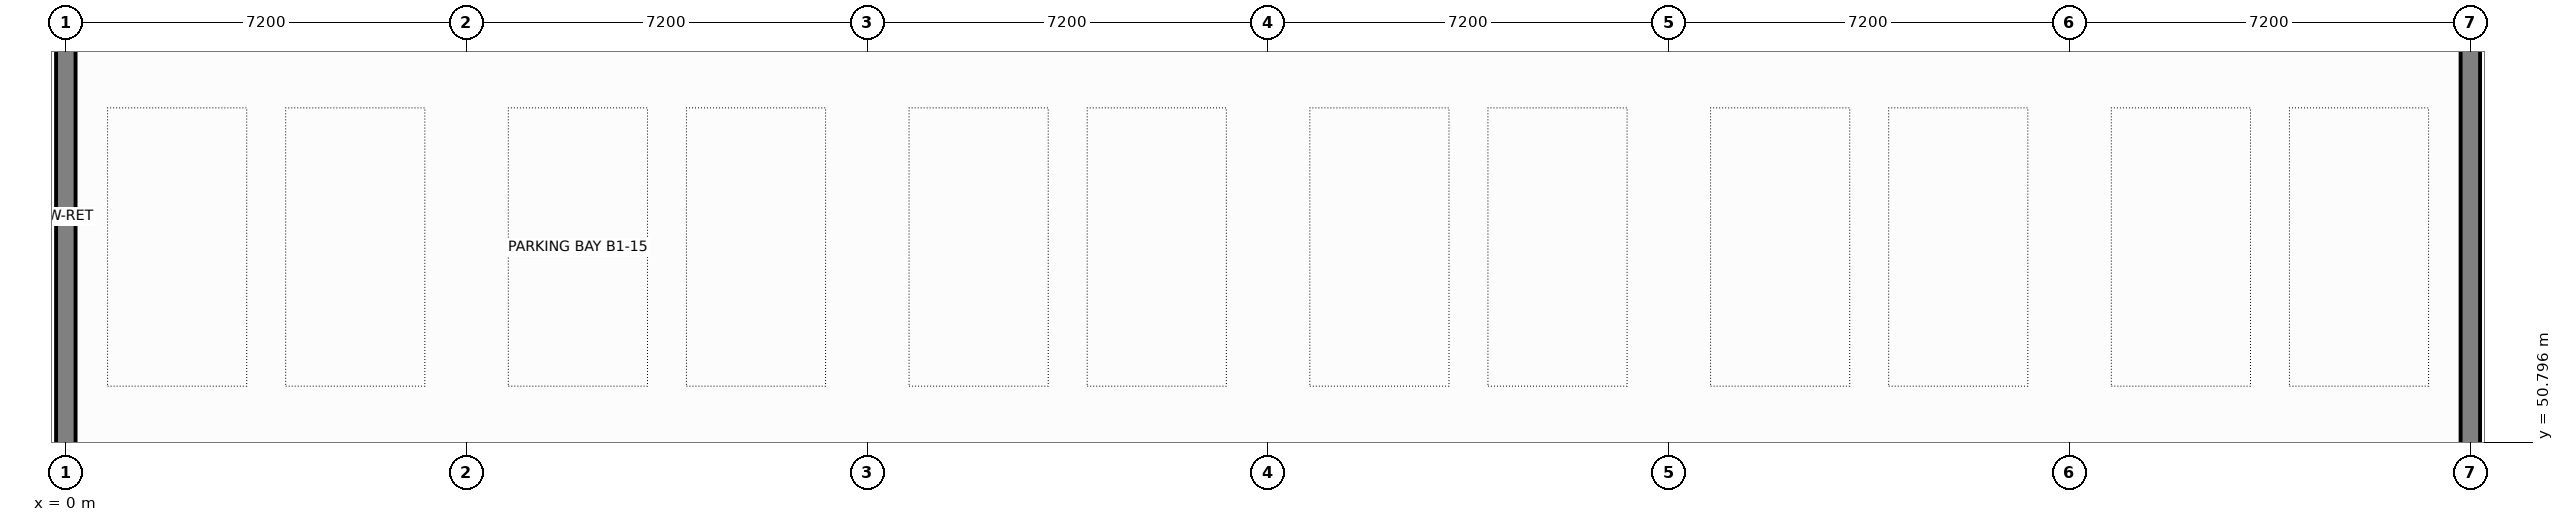
"""IFC4 building model, lengths in metres.
Left out: names, types, materials, properties, quantities, classifications, styles, units other than length and angle.
Written with IfcOpenShell. Run it as: python <this file> out.ifc"""

import sys

from ifc_helpers import new_model, si_unit, direction, frame, frame_2d, origin, place, context, subcontext, project, spatial, rectangle, extrude, element, save


model = new_model("IFC4")
c1 = context("Model", 3, precision=1e-05, world=origin(), true_north=direction((0.0, 1.0)))
c2 = subcontext(c1, "Body", "Model", "MODEL_VIEW")
j1 = project(units=[si_unit("LENGTHUNIT", "METRE"), si_unit("PLANEANGLEUNIT", "RADIAN")], contexts=[c1])
p1 = place(None, origin())
s1 = spatial("IfcSite", under=j1, at=p1, CompositionType="ELEMENT")
p2 = place(p1, origin())
s2 = spatial("IfcBuilding", under=s1, at=p2, CompositionType="ELEMENT")
p3 = place(p2, frame((0.0, 0.0, -4.2)))
s3 = spatial("IfcBuildingStorey", under=s2, at=p3, CompositionType="ELEMENT", Elevation=-4.2)
for number, where, z_axis, x_axis in (
    (1, (0.0, 50.4, 0.0), (0.0, 0.0, 1.0), (0.0, 1.0, 0.0)),
    (2, (43.2, 50.4, 0.0), (0.0, 0.0, 1.0), (0.0, 1.0, 0.0)),
):
    element("IfcWall", number, at=place(p3, frame(where, z_axis=z_axis, x_axis=x_axis)), inside=s3, PredefinedType="USERDEFINED", context=c2, shape_type="SweptSolid", body=[
        extrude(rectangle(XDim=8.4, YDim=0.35, at=frame_2d((4.2, 0.0))), origin(), (0.0, 0.0, 1.0), 3.96),
    ])
save(model, sys.argv[1])
